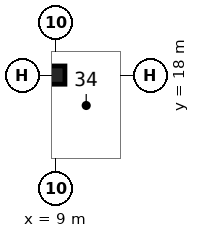
"""IFC4 building model, lengths in metres.
Left out: names, types, materials, properties, quantities, classifications, styles, units other than length and angle.
Written with IfcOpenShell. Run it as: python <this file> out.ifc"""

import sys

from ifc_helpers import new_model, si_unit, direction, frame, origin, origin_2d, place, context, subcontext, project, spatial, rectangle, extrude, element, save


model = new_model("IFC4")
c1 = context("Model", 3, precision=1e-05, world=origin(), true_north=direction((0.0, 1.0)))
c2 = subcontext(c1, "Body", "Model", "MODEL_VIEW")
j1 = project(units=[si_unit("LENGTHUNIT", "METRE"), si_unit("PLANEANGLEUNIT", "RADIAN")], contexts=[c1])
p1 = place(None, origin())
s1 = spatial("IfcSite", under=j1, at=p1, CompositionType="ELEMENT")
p2 = place(p1, origin())
s2 = spatial("IfcBuilding", under=s1, at=p2, CompositionType="ELEMENT")
p3 = place(p2, frame((0.0, 0.0, -9.0)))
s3 = spatial("IfcBuildingStorey", under=s2, at=p3, CompositionType="ELEMENT", Elevation=-9.0)
p4 = place(p3, frame((9.0, 18.0, 0.0), z_axis=(0.0, 0.0, 1.0), x_axis=(1.0, 0.0, 0.0)))
e1 = element("IfcColumn", 1, at=p4, inside=s3, PredefinedType="COLUMN", context=c2, shape_type="SweptSolid", body=[
    extrude(rectangle(XDim=1.2, YDim=1.2, at=origin_2d()), origin(), (0.0, 0.0, 1.0), 4.5),
])
save(model, sys.argv[1])
